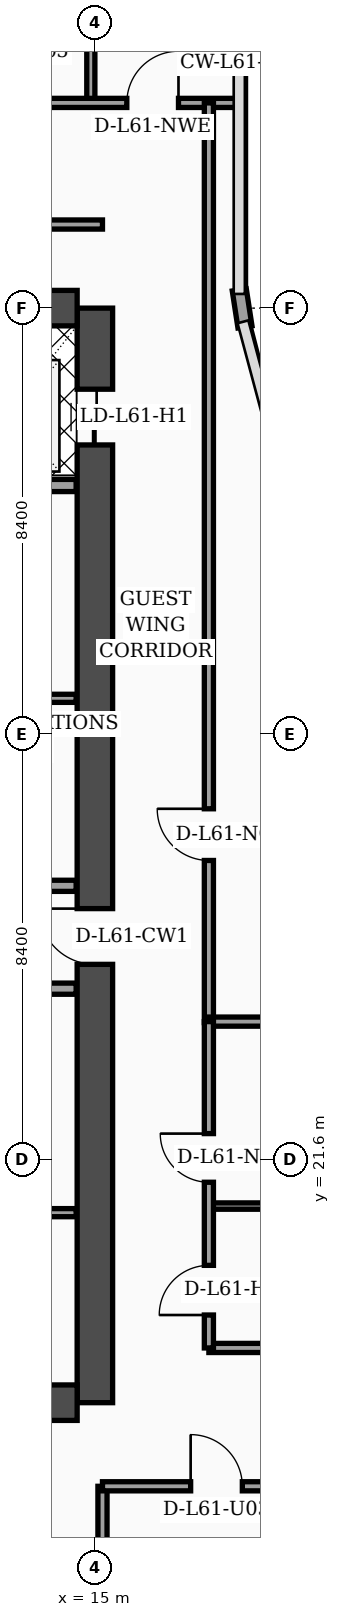
"""IFC4 building model, lengths in metres.
Left out: names, types, materials, properties, quantities, classifications, styles, units other than length and angle.
Written with IfcOpenShell. Run it as: python <this file> out.ifc"""

import sys

from ifc_helpers import new_model, si_unit, direction, frame, frame_2d, origin, place, context, subcontext, project, spatial, rectangle, extrude, element, fill, save


model = new_model("IFC4")
c1 = context("Model", 3, precision=1e-05, world=origin(), true_north=direction((0.0, 1.0)))
c2 = subcontext(c1, "Body", "Model", "MODEL_VIEW")
j1 = project(units=[si_unit("LENGTHUNIT", "METRE"), si_unit("PLANEANGLEUNIT", "RADIAN")], contexts=[c1])
p1 = place(None, origin())
s1 = spatial("IfcSite", under=j1, at=p1, CompositionType="ELEMENT")
p2 = place(p1, origin())
s2 = spatial("IfcBuilding", under=s1, at=p2, CompositionType="ELEMENT")
p3 = place(p2, frame((0.0, 0.0, 247.6)))
s3 = spatial("IfcBuildingStorey", under=s2, at=p3, CompositionType="ELEMENT", Elevation=247.6)
p4 = place(p3, frame((15.0, 16.8, 0.0), z_axis=(0.0, 0.0, 1.0), x_axis=(0.0, 1.0, 0.0)))
e1 = element("IfcWall", 1, at=p4, inside=s3, PredefinedType="SHEAR", context=c2, shape_type="SweptSolid", body=[
    extrude(rectangle(XDim=21.6, YDim=0.7, at=frame_2d((10.8, 0.0))), origin(), (0.0, 0.0, 1.0), 3.56),
])
p5 = place(p4, frame((8.65, 0.0, 0.0)))
e2 = element("IfcOpeningElement", 2, at=p5, cuts=e1, PredefinedType="OPENING", context=c2, shape_type="SweptSolid", body=[
    extrude(rectangle(XDim=1.1, YDim=2.2, at=frame_2d((0.55, 1.1))), frame((0.0, 0.36, 0.0), z_axis=(0.0, -1.0, 0.0), x_axis=(1.0, 0.0, 0.0)), (0.0, 0.0, 1.0), 0.72),
])
p6 = place(p4, frame((18.9, 0.0, 0.0)))
e3 = element("IfcOpeningElement", 3, at=p6, cuts=e1, PredefinedType="OPENING", context=c2, shape_type="SweptSolid", body=[
    extrude(rectangle(XDim=1.1, YDim=2.2, at=frame_2d((0.55, 1.1))), frame((0.0, 0.36, 0.0), z_axis=(0.0, -1.0, 0.0), x_axis=(1.0, 0.0, 0.0)), (0.0, 0.0, 1.0), 0.72),
])
p7 = place(p3, frame((4.55, 38.4, 0.0), z_axis=(0.0, 0.0, 1.0), x_axis=(1.0, 0.0, 0.0)))
e4 = element("IfcWall", 4, at=p7, inside=s3, PredefinedType="SHEAR", context=c2, shape_type="SweptSolid", body=[
    extrude(rectangle(XDim=10.1, YDim=0.7, at=frame_2d((5.05, 0.0))), origin(), (0.0, 0.0, 1.0), 3.56),
])
p8 = place(p7, frame((5.75, 0.0, 0.0)))
e5 = element("IfcOpeningElement", 5, at=p8, cuts=e4, PredefinedType="OPENING", context=c2, shape_type="SweptSolid", body=[
    extrude(rectangle(XDim=1.1, YDim=2.2, at=frame_2d((0.55, 1.1))), frame((0.0, 0.36, 0.0), z_axis=(0.0, -1.0, 0.0), x_axis=(1.0, 0.0, 0.0)), (0.0, 0.0, 1.0), 0.72),
])
p9 = place(p3, frame((4.55, 16.8, 0.0), z_axis=(0.0, 0.0, 1.0), x_axis=(1.0, 0.0, 0.0)))
e6 = element("IfcWall", 6, at=p9, inside=s3, PredefinedType="SHEAR", context=c2, shape_type="SweptSolid", body=[
    extrude(rectangle(XDim=10.1, YDim=0.7, at=frame_2d((5.05, 0.0))), origin(), (0.0, 0.0, 1.0), 3.56),
])
p10 = place(p3, frame((17.962, 38.03, 0.0), z_axis=(0.0, 0.0, 1.0), x_axis=(-0.15141125477, 0.988470855377, 0.0)))
e7 = element("IfcWall", 7, at=p10, inside=s3, PredefinedType="SOLIDWALL", context=c2, shape_type="SweptSolid", body=[
    extrude(rectangle(XDim=0.739, YDim=0.28, at=frame_2d((0.369, 0.0))), origin(), (0.0, 0.0, 1.0), 3.56),
])
p11 = place(p3, frame((9.68, 20.55, 0.0), z_axis=(0.0, 0.0, 1.0), x_axis=(1.0, 0.0, 0.0)))
e8 = element("IfcWall", 8, at=p11, inside=s3, PredefinedType="PARTITIONING", context=c2, shape_type="SweptSolid", body=[
    extrude(rectangle(XDim=4.95, YDim=0.16, at=frame_2d((2.475, 0.0))), origin(), (0.0, 0.0, 1.0), 3.56),
])
p12 = place(p11, frame((1.1, 0.0, 0.0)))
e9 = element("IfcOpeningElement", 9, at=p12, cuts=e8, PredefinedType="OPENING", context=c2, shape_type="SweptSolid", body=[
    extrude(rectangle(XDim=0.98, YDim=2.15, at=frame_2d((0.49, 1.075))), frame((0.0, 0.09, 0.0), z_axis=(0.0, -1.0, 0.0), x_axis=(1.0, 0.0, 0.0)), (0.0, 0.0, 1.0), 0.18),
])
p13 = place(p3, frame((9.68, 24.97, 0.0), z_axis=(0.0, 0.0, 1.0), x_axis=(1.0, 0.0, 0.0)))
e10 = element("IfcWall", 10, at=p13, inside=s3, PredefinedType="SOLIDWALL", context=c2, shape_type="SweptSolid", body=[
    extrude(rectangle(XDim=4.95, YDim=0.22, at=frame_2d((2.475, 0.0))), origin(), (0.0, 0.0, 1.0), 2.99),
])
p14 = place(p13, frame((0.9, 0.0, 0.0)))
e11 = element("IfcOpeningElement", 11, at=p14, cuts=e10, PredefinedType="OPENING", context=c2, shape_type="SweptSolid", body=[
    extrude(rectangle(XDim=0.98, YDim=2.15, at=frame_2d((0.49, 1.075))), frame((0.0, 0.12, 0.0), z_axis=(0.0, -1.0, 0.0), x_axis=(1.0, 0.0, 0.0)), (0.0, 0.0, 1.0), 0.24),
])
p15 = place(p3, frame((12.25, 27.0, 0.0), z_axis=(0.0, 0.0, 1.0), x_axis=(1.0, 0.0, 0.0)))
e12 = element("IfcWall", 12, at=p15, inside=s3, PredefinedType="SOLIDWALL", context=c2, shape_type="SweptSolid", body=[
    extrude(rectangle(XDim=2.38, YDim=0.22, at=frame_2d((1.19, 0.0))), origin(), (0.0, 0.0, 1.0), 3.56),
])
p16 = place(p3, frame((12.25, 30.7, 0.0), z_axis=(0.0, 0.0, 1.0), x_axis=(1.0, 0.0, 0.0)))
e13 = element("IfcWall", 13, at=p16, inside=s3, PredefinedType="PARTITIONING", context=c2, shape_type="SweptSolid", body=[
    extrude(rectangle(XDim=2.38, YDim=0.16, at=frame_2d((1.19, 0.0))), origin(), (0.0, 0.0, 1.0), 3.56),
])
p17 = place(p16, frame((0.55, 0.0, 0.0)))
e14 = element("IfcOpeningElement", 14, at=p17, cuts=e13, PredefinedType="OPENING", context=c2, shape_type="SweptSolid", body=[
    extrude(rectangle(XDim=0.98, YDim=2.15, at=frame_2d((0.49, 1.075))), frame((0.0, 0.09, 0.0), z_axis=(0.0, -1.0, 0.0), x_axis=(1.0, 0.0, 0.0)), (0.0, 0.0, 1.0), 0.18),
])
p18 = place(p3, frame((9.66, 34.9, 0.0), z_axis=(0.0, 0.0, 1.0), x_axis=(1.0, 0.0, 0.0)))
e15 = element("IfcWall", 15, at=p18, inside=s3, PredefinedType="SOLIDWALL", context=c2, shape_type="SweptSolid", body=[
    extrude(rectangle(XDim=4.97, YDim=0.24, at=frame_2d((2.485, 0.0))), origin(), (0.0, 0.0, 1.0), 3.56),
])
p19 = place(p3, frame((15.15, 2.44, 0.0), z_axis=(0.0, 0.0, 1.0), x_axis=(0.0, 1.0, 0.0)))
e16 = element("IfcWall", 16, at=p19, inside=s3, PredefinedType="PARTITIONING", context=c2, shape_type="SweptSolid", body=[
    extrude(rectangle(XDim=12.71, YDim=0.18, at=frame_2d((6.355, 0.0))), origin(), (0.0, 0.0, 1.0), 3.09),
])
p20 = place(p3, frame((15.15, 15.15, 0.0), z_axis=(0.0, 0.0, 1.0), x_axis=(1.0, 0.0, 0.0)))
e17 = element("IfcWall", 17, at=p20, inside=s3, PredefinedType="PARTITIONING", context=c2, shape_type="SweptSolid", body=[
    extrude(rectangle(XDim=6.45, YDim=0.18, at=frame_2d((3.225, 0.0))), origin(), (0.0, 0.0, 1.0), 2.59),
])
p21 = place(p20, frame((1.74, 0.0, 0.0)))
e18 = element("IfcOpeningElement", 18, at=p21, cuts=e17, PredefinedType="OPENING", context=c2, shape_type="SweptSolid", body=[
    extrude(rectangle(XDim=1.02, YDim=2.2, at=frame_2d((0.51, 1.1))), frame((0.0, 0.1, 0.0), z_axis=(0.0, -1.0, 0.0), x_axis=(1.0, 0.0, 0.0)), (0.0, 0.0, 1.0), 0.2),
])
p22 = place(p3, frame((14.92, 42.45, 0.0), z_axis=(0.0, 0.0, 1.0), x_axis=(0.0, 1.0, 0.0)))
e19 = element("IfcWall", 19, at=p22, inside=s3, PredefinedType="PARTITIONING", context=c2, shape_type="SweptSolid", body=[
    extrude(rectangle(XDim=5.35, YDim=0.16, at=frame_2d((2.675, 0.0))), origin(), (0.0, 0.0, 1.0), 3.09),
])
p23 = place(p3, frame((0.08, 42.45, 0.0), z_axis=(0.0, 0.0, 1.0), x_axis=(1.0, 0.0, 0.0)))
e20 = element("IfcWall", 20, at=p23, inside=s3, PredefinedType="PARTITIONING", context=c2, shape_type="SweptSolid", body=[
    extrude(rectangle(XDim=17.77, YDim=0.18, at=frame_2d((8.885, 0.0))), origin(), (0.0, 0.0, 1.0), 2.99),
])
p24 = place(p23, frame((0.9, 0.0, 0.0)))
e21 = element("IfcOpeningElement", 21, at=p24, cuts=e20, PredefinedType="OPENING", context=c2, shape_type="SweptSolid", body=[
    extrude(rectangle(XDim=1.02, YDim=2.2, at=frame_2d((0.51, 1.1))), frame((0.0, 0.1, 0.0), z_axis=(0.0, -1.0, 0.0), x_axis=(1.0, 0.0, 0.0)), (0.0, 0.0, 1.0), 0.2),
])
p25 = place(p23, frame((4.45, 0.0, 0.0)))
e22 = element("IfcOpeningElement", 22, at=p25, cuts=e20, PredefinedType="OPENING", context=c2, shape_type="SweptSolid", body=[
    extrude(rectangle(XDim=1.02, YDim=2.2, at=frame_2d((0.51, 1.1))), frame((0.0, 0.1, 0.0), z_axis=(0.0, -1.0, 0.0), x_axis=(1.0, 0.0, 0.0)), (0.0, 0.0, 1.0), 0.2),
])
p26 = place(p23, frame((10.33, 0.0, 0.0)))
e23 = element("IfcOpeningElement", 23, at=p26, cuts=e20, PredefinedType="OPENING", context=c2, shape_type="SweptSolid", body=[
    extrude(rectangle(XDim=1.02, YDim=2.2, at=frame_2d((0.51, 1.1))), frame((0.0, 0.1, 0.0), z_axis=(0.0, -1.0, 0.0), x_axis=(1.0, 0.0, 0.0)), (0.0, 0.0, 1.0), 0.2),
])
p27 = place(p23, frame((15.55, 0.0, 0.0)))
e24 = element("IfcOpeningElement", 24, at=p27, cuts=e20, PredefinedType="OPENING", context=c2, shape_type="SweptSolid", body=[
    extrude(rectangle(XDim=1.02, YDim=2.2, at=frame_2d((0.51, 1.1))), frame((0.0, 0.1, 0.0), z_axis=(0.0, -1.0, 0.0), x_axis=(1.0, 0.0, 0.0)), (0.0, 0.0, 1.0), 0.2),
])
p28 = place(p3, frame((17.25, 24.3, 0.0), z_axis=(0.0, 0.0, 1.0), x_axis=(0.0, 1.0, 0.0)))
e25 = element("IfcWall", 25, at=p28, inside=s3, PredefinedType="PARTITIONING", context=c2, shape_type="SweptSolid", body=[
    extrude(rectangle(XDim=18.15, YDim=0.18, at=frame_2d((9.075, 0.0))), origin(), (0.0, 0.0, 1.0), 2.99),
])
p29 = place(p28, frame((3.2, 0.0, 0.0)))
e26 = element("IfcOpeningElement", 26, at=p29, cuts=e25, PredefinedType="OPENING", context=c2, shape_type="SweptSolid", body=[
    extrude(rectangle(XDim=1.02, YDim=2.2, at=frame_2d((0.51, 1.1))), frame((0.0, 0.1, 0.0), z_axis=(0.0, -1.0, 0.0), x_axis=(1.0, 0.0, 0.0)), (0.0, 0.0, 1.0), 0.2),
])
p30 = place(p3, frame((3.83, 40.05, 0.0), z_axis=(0.0, 0.0, 1.0), x_axis=(1.0, 0.0, 0.0)))
e27 = element("IfcWall", 27, at=p30, inside=s3, PredefinedType="PARTITIONING", context=c2, shape_type="SweptSolid", body=[
    extrude(rectangle(XDim=11.32, YDim=0.18, at=frame_2d((5.66, 0.0))), origin(), (0.0, 0.0, 1.0), 2.99),
])
p31 = place(p3, frame((17.25, 17.88, 0.0), z_axis=(0.0, 0.0, 1.0), x_axis=(1.0, 0.0, 0.0)))
e28 = element("IfcWall", 28, at=p31, inside=s3, PredefinedType="PARTITIONING", context=c2, shape_type="SweptSolid", body=[
    extrude(rectangle(XDim=4.3, YDim=0.18, at=frame_2d((2.15, 0.0))), origin(), (0.0, 0.0, 1.0), 3.09),
])
p32 = place(p3, frame((17.25, 20.68, 0.0), z_axis=(0.0, 0.0, 1.0), x_axis=(1.0, 0.0, 0.0)))
e29 = element("IfcWall", 29, at=p32, inside=s3, PredefinedType="PARTITIONING", context=c2, shape_type="SweptSolid", body=[
    extrude(rectangle(XDim=4.3, YDim=0.125, at=frame_2d((2.15, 0.0))), origin(), (0.0, 0.0, 1.0), 3.56),
])
p33 = place(p3, frame((17.25, 24.32, 0.0), z_axis=(0.0, 0.0, 1.0), x_axis=(1.0, 0.0, 0.0)))
e30 = element("IfcWall", 30, at=p33, inside=s3, PredefinedType="PARTITIONING", context=c2, shape_type="SweptSolid", body=[
    extrude(rectangle(XDim=4.35, YDim=0.18, at=frame_2d((2.175, 0.0))), origin(), (0.0, 0.0, 1.0), 3.56),
])
p34 = place(p3, frame((17.25, 17.88, 0.0), z_axis=(0.0, 0.0, 1.0), x_axis=(0.0, 1.0, 0.0)))
e31 = element("IfcWall", 31, at=p34, inside=s3, PredefinedType="PARTITIONING", context=c2, shape_type="SweptSolid", body=[
    extrude(rectangle(XDim=6.44, YDim=0.18, at=frame_2d((3.22, 0.0))), origin(), (0.0, 0.0, 1.0), 3.09),
])
p35 = place(p34, frame((0.65, 0.0, 0.0)))
e32 = element("IfcOpeningElement", 32, at=p35, cuts=e31, PredefinedType="OPENING", context=c2, shape_type="SweptSolid", body=[
    extrude(rectangle(XDim=0.98, YDim=2.15, at=frame_2d((0.49, 1.075))), frame((0.0, 0.1, 0.0), z_axis=(0.0, -1.0, 0.0), x_axis=(1.0, 0.0, 0.0)), (0.0, 0.0, 1.0), 0.2),
])
p36 = place(p34, frame((3.27, 0.0, 0.0)))
e33 = element("IfcOpeningElement", 33, at=p36, cuts=e31, PredefinedType="OPENING", context=c2, shape_type="SweptSolid", body=[
    extrude(rectangle(XDim=0.96, YDim=2.2, at=frame_2d((0.48, 1.1))), frame((0.0, 0.1, 0.0), z_axis=(0.0, -1.0, 0.0), x_axis=(1.0, 0.0, 0.0)), (0.0, 0.0, 1.0), 0.2),
])
p37 = place(p21, origin())
e34 = element("IfcDoor", 34, at=p37, inside=s3, OperationType="SINGLE_SWING_LEFT", PredefinedType="DOOR", context=c2, shape_type="SweptSolid", body=[
    extrude(rectangle(XDim=1.02, YDim=2.2, at=frame_2d((0.51, 1.1))), frame((0.0, 0.025, 0.0), z_axis=(0.0, -1.0, 0.0), x_axis=(1.0, 0.0, 0.0)), (0.0, 0.0, 1.0), 0.05),
])
fill(e18, e34)
p38 = place(p27, origin())
e35 = element("IfcDoor", 35, at=p38, inside=s3, OperationType="SINGLE_SWING_RIGHT", PredefinedType="DOOR", context=c2, shape_type="SweptSolid", body=[
    extrude(rectangle(XDim=1.02, YDim=2.2, at=frame_2d((0.51, 1.1))), frame((0.0, 0.025, 0.0), z_axis=(0.0, -1.0, 0.0), x_axis=(1.0, 0.0, 0.0)), (0.0, 0.0, 1.0), 0.05),
])
fill(e24, e35)
p39 = place(p29, origin())
e36 = element("IfcDoor", 36, at=p39, inside=s3, OperationType="SINGLE_SWING_RIGHT", PredefinedType="DOOR", context=c2, shape_type="SweptSolid", body=[
    extrude(rectangle(XDim=1.02, YDim=2.2, at=frame_2d((0.51, 1.1))), frame((0.0, 0.025, 0.0), z_axis=(0.0, -1.0, 0.0), x_axis=(1.0, 0.0, 0.0)), (0.0, 0.0, 1.0), 0.05),
])
fill(e26, e36)
p40 = place(p35, origin())
e37 = element("IfcDoor", 37, at=p40, inside=s3, OperationType="SINGLE_SWING_LEFT", PredefinedType="DOOR", context=c2, shape_type="SweptSolid", body=[
    extrude(rectangle(XDim=0.98, YDim=2.15, at=frame_2d((0.49, 1.075))), frame((0.0, 0.025, 0.0), z_axis=(0.0, -1.0, 0.0), x_axis=(1.0, 0.0, 0.0)), (0.0, 0.0, 1.0), 0.05),
])
fill(e32, e37)
p41 = place(p36, origin())
e38 = element("IfcDoor", 38, at=p41, inside=s3, OperationType="SINGLE_SWING_RIGHT", PredefinedType="DOOR", context=c2, shape_type="SweptSolid", body=[
    extrude(rectangle(XDim=0.96, YDim=2.2, at=frame_2d((0.48, 1.1))), frame((0.0, 0.025, 0.0), z_axis=(0.0, -1.0, 0.0), x_axis=(1.0, 0.0, 0.0)), (0.0, 0.0, 1.0), 0.05),
])
fill(e33, e38)
p42 = place(p5, origin())
e39 = element("IfcDoor", 39, at=p42, inside=s3, OperationType="SINGLE_SWING_RIGHT", PredefinedType="DOOR", context=c2, shape_type="SweptSolid", body=[
    extrude(rectangle(XDim=1.1, YDim=2.2, at=frame_2d((0.55, 1.1))), frame((0.0, 0.025, 0.0), z_axis=(0.0, -1.0, 0.0), x_axis=(1.0, 0.0, 0.0)), (0.0, 0.0, 1.0), 0.05),
])
fill(e2, e39)
p43 = place(p6, origin())
e40 = element("IfcDoor", 40, at=p43, inside=s3, OperationType="DOUBLE_DOOR_SLIDING", PredefinedType="DOOR", context=c2, shape_type="SweptSolid", body=[
    extrude(rectangle(XDim=1.1, YDim=2.2, at=frame_2d((0.55, 1.1))), frame((0.0, 0.025, 0.0), z_axis=(0.0, -1.0, 0.0), x_axis=(1.0, 0.0, 0.0)), (0.0, 0.0, 1.0), 0.05),
])
fill(e3, e40)
save(model, sys.argv[1])
